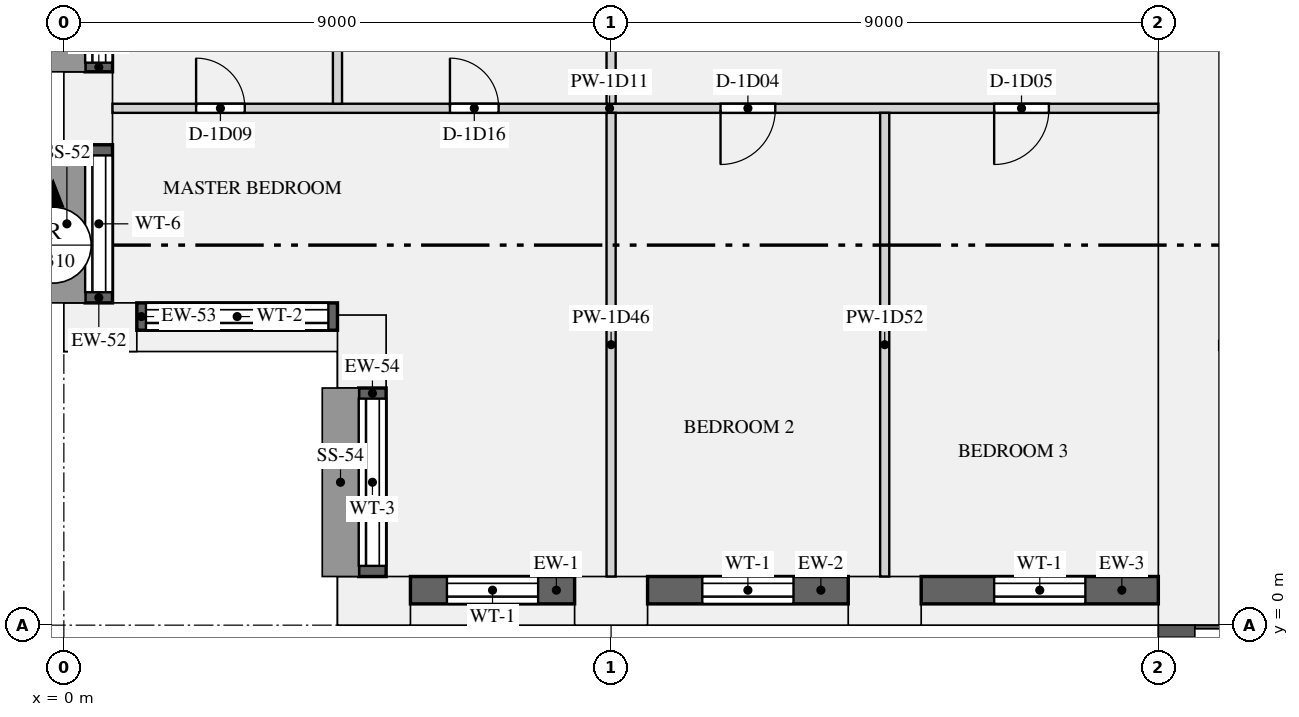
"""IFC4 building model, lengths in metres.
Left out: names, types, materials, properties, quantities, classifications, styles, units other than length and angle.
Written with IfcOpenShell. Run it as: python <this file> out.ifc"""

import sys

from ifc_helpers import new_model, si_unit, direction, frame, frame_2d, origin, origin_2d, place, context, subcontext, project, spatial, rectangle, extrude, element, fill, save


model = new_model("IFC4")
c1 = context("Model", 3, precision=1e-05, world=origin(), true_north=direction((0.0, 1.0)))
c2 = subcontext(c1, "Body", "Model", "MODEL_VIEW")
j1 = project(units=[si_unit("LENGTHUNIT", "METRE"), si_unit("PLANEANGLEUNIT", "RADIAN")], contexts=[c1])
p1 = place(None, origin())
s1 = spatial("IfcSite", under=j1, at=p1, CompositionType="ELEMENT")
p2 = place(p1, origin())
s2 = spatial("IfcBuilding", under=s1, at=p2, CompositionType="ELEMENT")
p3 = place(p2, frame((0.0, 0.0, 47.85)))
s3 = spatial("IfcBuildingStorey", under=s2, at=p3, CompositionType="ELEMENT", Elevation=47.85)
for number, where, z_axis, x_axis in (
    (1, (5.1, 0.4, 0.0), (0.0, 0.0, 1.0), (1.0, 0.0, 0.0)),
    (2, (9.0, 0.4, 0.0), (0.0, 0.0, 1.0), (1.0, 0.0, 0.0)),
    (3, (13.5, 0.4, 0.0), (0.0, 0.0, 1.0), (1.0, 0.0, 0.0)),
    (4, (0.4, 8.5, 0.0), (0.0, 0.0, 1.0), (0.0, -1.0, 0.0)),
    (5, (0.6, 4.9, 0.0), (0.0, 0.0, 1.0), (1.0, 0.0, 0.0)),
    (6, (4.9, 4.5, 0.0), (0.0, 0.0, 1.0), (0.0, -1.0, 0.0)),
):
    element("IfcColumn", number, at=place(p3, frame(where, z_axis=z_axis, x_axis=x_axis)), inside=s3, PredefinedType="USERDEFINED", context=c2, shape_type="SweptSolid", body=[
        extrude(rectangle(XDim=1.2, YDim=0.8, at=origin_2d()), origin(), (0.0, 0.0, 1.0), 3.15),
    ])
p4 = place(p3, frame((18.5, 0.0, 0.0), z_axis=(0.0, 0.0, 1.0), x_axis=(0.0, 1.0, 0.0)))
e7 = element("IfcWall", 7, at=p4, inside=s3, PredefinedType="SHEAR", context=c2, shape_type="SweptSolid", body=[
    extrude(rectangle(XDim=12.5, YDim=1.0, at=frame_2d((6.25, 0.0))), origin(), (0.0, 0.0, 1.0), 3.15),
])
p5 = place(p3, frame((5.7, 0.575, 0.9), z_axis=(0.0, 0.0, 1.0), x_axis=(1.0, 0.0, 0.0)))
e8 = element("IfcWall", 8, at=p5, inside=s3, PredefinedType="SOLIDWALL", context=c2, shape_type="SweptSolid", body=[
    extrude(rectangle(XDim=2.7, YDim=0.45, at=frame_2d((1.35, 0.0))), origin(), (0.0, 0.0, 1.0), 1.93),
])
p6 = place(p5, frame((0.6, 0.0, 0.15)))
e9 = element("IfcOpeningElement", 9, at=p6, cuts=e8, PredefinedType="OPENING", context=c2, shape_type="SweptSolid", body=[
    extrude(rectangle(XDim=1.5, YDim=1.5, at=frame_2d((0.75, 0.75))), frame((0.0, 0.235, 0.0), z_axis=(0.0, -1.0, 0.0), x_axis=(1.0, 0.0, 0.0)), (0.0, 0.0, 1.0), 0.47),
])
p7 = place(p3, frame((9.6, 0.575, 0.9), z_axis=(0.0, 0.0, 1.0), x_axis=(1.0, 0.0, 0.0)))
e10 = element("IfcWall", 10, at=p7, inside=s3, PredefinedType="SOLIDWALL", context=c2, shape_type="SweptSolid", body=[
    extrude(rectangle(XDim=3.3, YDim=0.45, at=frame_2d((1.65, 0.0))), origin(), (0.0, 0.0, 1.0), 1.93),
])
p8 = place(p7, frame((0.9, 0.0, 0.15)))
e11 = element("IfcOpeningElement", 11, at=p8, cuts=e10, PredefinedType="OPENING", context=c2, shape_type="SweptSolid", body=[
    extrude(rectangle(XDim=1.5, YDim=1.5, at=frame_2d((0.75, 0.75))), frame((0.0, 0.235, 0.0), z_axis=(0.0, -1.0, 0.0), x_axis=(1.0, 0.0, 0.0)), (0.0, 0.0, 1.0), 0.47),
])
p9 = place(p3, frame((14.1, 0.575, 0.9), z_axis=(0.0, 0.0, 1.0), x_axis=(1.0, 0.0, 0.0)))
e12 = element("IfcWall", 12, at=p9, inside=s3, PredefinedType="SOLIDWALL", context=c2, shape_type="SweptSolid", body=[
    extrude(rectangle(XDim=3.9, YDim=0.45, at=frame_2d((1.95, 0.0))), origin(), (0.0, 0.0, 1.0), 1.93),
])
p10 = place(p9, frame((1.2, 0.0, 0.15)))
e13 = element("IfcOpeningElement", 13, at=p10, cuts=e12, PredefinedType="OPENING", context=c2, shape_type="SweptSolid", body=[
    extrude(rectangle(XDim=1.5, YDim=1.5, at=frame_2d((0.75, 0.75))), frame((0.0, 0.235, 0.0), z_axis=(0.0, -1.0, 0.0), x_axis=(1.0, 0.0, 0.0)), (0.0, 0.0, 1.0), 0.47),
])
p11 = place(p3, frame((0.575, 11.9, 0.9), z_axis=(0.0, 0.0, 1.0), x_axis=(0.0, -1.0, 0.0)))
e14 = element("IfcWall", 14, at=p11, inside=s3, PredefinedType="SOLIDWALL", context=c2, shape_type="SweptSolid", body=[
    extrude(rectangle(XDim=2.8, YDim=0.45, at=frame_2d((1.4, 0.0))), origin(), (0.0, 0.0, 1.0), 1.93),
])
p12 = place(p11, frame((0.15, 0.0, 0.15)))
e15 = element("IfcOpeningElement", 15, at=p12, cuts=e14, PredefinedType="OPENING", context=c2, shape_type="SweptSolid", body=[
    extrude(rectangle(XDim=2.5, YDim=1.5, at=frame_2d((1.25, 0.75))), frame((0.0, 0.235, 0.0), z_axis=(0.0, -1.0, 0.0), x_axis=(1.0, 0.0, 0.0)), (0.0, 0.0, 1.0), 0.47),
])
p13 = place(p3, frame((0.575, 7.9, 0.9), z_axis=(0.0, 0.0, 1.0), x_axis=(0.0, -1.0, 0.0)))
e16 = element("IfcWall", 16, at=p13, inside=s3, PredefinedType="SOLIDWALL", context=c2, shape_type="SweptSolid", body=[
    extrude(rectangle(XDim=2.6, YDim=0.45, at=frame_2d((1.3, 0.0))), origin(), (0.0, 0.0, 1.0), 1.93),
])
p14 = place(p13, frame((0.175, 0.0, 0.15)))
e17 = element("IfcOpeningElement", 17, at=p14, cuts=e16, PredefinedType="OPENING", context=c2, shape_type="SweptSolid", body=[
    extrude(rectangle(XDim=2.25, YDim=1.5, at=frame_2d((1.125, 0.75))), frame((0.0, 0.235, 0.0), z_axis=(0.0, -1.0, 0.0), x_axis=(1.0, 0.0, 0.0)), (0.0, 0.0, 1.0), 0.47),
])
p15 = place(p3, frame((1.2, 5.075, 0.9), z_axis=(0.0, 0.0, 1.0), x_axis=(1.0, 0.0, 0.0)))
e18 = element("IfcWall", 18, at=p15, inside=s3, PredefinedType="SOLIDWALL", context=c2, shape_type="SweptSolid", body=[
    extrude(rectangle(XDim=3.3, YDim=0.45, at=frame_2d((1.65, 0.0))), origin(), (0.0, 0.0, 1.0), 1.93),
])
p16 = place(p15, frame((0.15, 0.0, 0.15)))
e19 = element("IfcOpeningElement", 19, at=p16, cuts=e18, PredefinedType="OPENING", context=c2, shape_type="SweptSolid", body=[
    extrude(rectangle(XDim=3.0, YDim=1.5, at=frame_2d((1.5, 0.75))), frame((0.0, 0.235, 0.0), z_axis=(0.0, -1.0, 0.0), x_axis=(1.0, 0.0, 0.0)), (0.0, 0.0, 1.0), 0.47),
])
p17 = place(p3, frame((5.075, 3.9, 0.9), z_axis=(0.0, 0.0, 1.0), x_axis=(0.0, -1.0, 0.0)))
e20 = element("IfcWall", 20, at=p17, inside=s3, PredefinedType="SOLIDWALL", context=c2, shape_type="SweptSolid", body=[
    extrude(rectangle(XDim=3.1, YDim=0.45, at=frame_2d((1.55, 0.0))), origin(), (0.0, 0.0, 1.0), 1.93),
])
p18 = place(p17, frame((0.175, 0.0, 0.15)))
e21 = element("IfcOpeningElement", 21, at=p18, cuts=e20, PredefinedType="OPENING", context=c2, shape_type="SweptSolid", body=[
    extrude(rectangle(XDim=2.75, YDim=1.5, at=frame_2d((1.375, 0.75))), frame((0.0, 0.235, 0.0), z_axis=(0.0, -1.0, 0.0), x_axis=(1.0, 0.0, 0.0)), (0.0, 0.0, 1.0), 0.47),
])
p19 = place(p3, frame((19.0, 4.6, 0.0), z_axis=(0.0, 0.0, 1.0), x_axis=(1.0, 0.0, 0.0)))
e22 = element("IfcWall", 22, at=p19, inside=s3, PredefinedType="PARTITIONING", context=c2, shape_type="SweptSolid", body=[
    extrude(rectangle(XDim=8.3, YDim=0.15, at=frame_2d((4.15, 0.0))), origin(), (0.0, 0.0, 1.0), 2.83),
])
p20 = place(p19, frame((0.45, 0.0, 0.0)))
e23 = element("IfcOpeningElement", 23, at=p20, cuts=e22, PredefinedType="OPENING", context=c2, shape_type="SweptSolid", body=[
    extrude(rectangle(XDim=0.9, YDim=2.1, at=frame_2d((0.45, 1.05))), frame((0.0, 0.085, 0.0), z_axis=(0.0, -1.0, 0.0), x_axis=(1.0, 0.0, 0.0)), (0.0, 0.0, 1.0), 0.17),
])
p21 = place(p19, frame((5.85, 0.0, 0.0)))
e24 = element("IfcOpeningElement", 24, at=p21, cuts=e22, PredefinedType="OPENING", context=c2, shape_type="SweptSolid", body=[
    extrude(rectangle(XDim=0.9, YDim=2.1, at=frame_2d((0.45, 1.05))), frame((0.0, 0.085, 0.0), z_axis=(0.0, -1.0, 0.0), x_axis=(1.0, 0.0, 0.0)), (0.0, 0.0, 1.0), 0.17),
])
p22 = place(p3, frame((0.8, 8.5, 0.0), z_axis=(0.0, 0.0, 1.0), x_axis=(1.0, 0.0, 0.0)))
e25 = element("IfcWall", 25, at=p22, inside=s3, PredefinedType="PARTITIONING", context=c2, shape_type="SweptSolid", body=[
    extrude(rectangle(XDim=17.2, YDim=0.15, at=frame_2d((8.6, 0.0))), origin(), (0.0, 0.0, 1.0), 2.83),
])
p23 = place(p22, frame((10.0, 0.0, 0.0)))
e26 = element("IfcOpeningElement", 26, at=p23, cuts=e25, PredefinedType="OPENING", context=c2, shape_type="SweptSolid", body=[
    extrude(rectangle(XDim=0.9, YDim=2.1, at=frame_2d((0.45, 1.05))), frame((0.0, 0.085, 0.0), z_axis=(0.0, -1.0, 0.0), x_axis=(1.0, 0.0, 0.0)), (0.0, 0.0, 1.0), 0.17),
])
p24 = place(p22, frame((14.5, 0.0, 0.0)))
e27 = element("IfcOpeningElement", 27, at=p24, cuts=e25, PredefinedType="OPENING", context=c2, shape_type="SweptSolid", body=[
    extrude(rectangle(XDim=0.9, YDim=2.1, at=frame_2d((0.45, 1.05))), frame((0.0, 0.085, 0.0), z_axis=(0.0, -1.0, 0.0), x_axis=(1.0, 0.0, 0.0)), (0.0, 0.0, 1.0), 0.17),
])
p25 = place(p22, frame((1.375, 0.0, 0.0)))
e28 = element("IfcOpeningElement", 28, at=p25, cuts=e25, PredefinedType="OPENING", context=c2, shape_type="SweptSolid", body=[
    extrude(rectangle(XDim=0.8, YDim=2.1, at=frame_2d((0.4, 1.05))), frame((0.0, 0.085, 0.0), z_axis=(0.0, -1.0, 0.0), x_axis=(1.0, 0.0, 0.0)), (0.0, 0.0, 1.0), 0.17),
])
p26 = place(p22, frame((5.55, 0.0, 0.0)))
e29 = element("IfcOpeningElement", 29, at=p26, cuts=e25, PredefinedType="OPENING", context=c2, shape_type="SweptSolid", body=[
    extrude(rectangle(XDim=0.8, YDim=2.1, at=frame_2d((0.4, 1.05))), frame((0.0, 0.085, 0.0), z_axis=(0.0, -1.0, 0.0), x_axis=(1.0, 0.0, 0.0)), (0.0, 0.0, 1.0), 0.17),
])
p27 = place(p3, frame((9.0, 0.8, 0.0), z_axis=(0.0, 0.0, 1.0), x_axis=(0.0, 1.0, 0.0)))
e30 = element("IfcWall", 30, at=p27, inside=s3, PredefinedType="PARTITIONING", context=c2, shape_type="SweptSolid", body=[
    extrude(rectangle(XDim=7.625, YDim=0.15, at=frame_2d((3.812, 0.0))), origin(), (0.0, 0.0, 1.0), 2.83),
])
p28 = place(p3, frame((9.0, 8.575, 0.0), z_axis=(0.0, 0.0, 1.0), x_axis=(0.0, 1.0, 0.0)))
e31 = element("IfcWall", 31, at=p28, inside=s3, PredefinedType="PARTITIONING", context=c2, shape_type="SweptSolid", body=[
    extrude(rectangle(XDim=3.85, YDim=0.15, at=frame_2d((1.925, 0.0))), origin(), (0.0, 0.0, 1.0), 2.83),
])
p29 = place(p28, frame((1.15, 0.0, 0.0)))
e32 = element("IfcOpeningElement", 32, at=p29, cuts=e31, PredefinedType="OPENING", context=c2, shape_type="SweptSolid", body=[
    extrude(rectangle(XDim=0.8, YDim=2.1, at=frame_2d((0.4, 1.05))), frame((0.0, 0.085, 0.0), z_axis=(0.0, -1.0, 0.0), x_axis=(1.0, 0.0, 0.0)), (0.0, 0.0, 1.0), 0.17),
])
p30 = place(p3, frame((13.5, 0.8, 0.0), z_axis=(0.0, 0.0, 1.0), x_axis=(0.0, 1.0, 0.0)))
e33 = element("IfcWall", 33, at=p30, inside=s3, PredefinedType="PARTITIONING", context=c2, shape_type="SweptSolid", body=[
    extrude(rectangle(XDim=7.625, YDim=0.15, at=frame_2d((3.812, 0.0))), origin(), (0.0, 0.0, 1.0), 2.83),
])
p31 = place(p3, frame((4.5, 8.575, 0.0), z_axis=(0.0, 0.0, 1.0), x_axis=(0.0, 1.0, 0.0)))
e34 = element("IfcWall", 34, at=p31, inside=s3, PredefinedType="PARTITIONING", context=c2, shape_type="SweptSolid", body=[
    extrude(rectangle(XDim=3.85, YDim=0.15, at=frame_2d((1.925, 0.0))), origin(), (0.0, 0.0, 1.0), 2.83),
])
p32 = place(p31, frame((1.525, 0.0, 0.0)))
e35 = element("IfcOpeningElement", 35, at=p32, cuts=e34, PredefinedType="OPENING", context=c2, shape_type="SweptSolid", body=[
    extrude(rectangle(XDim=0.8, YDim=2.1, at=frame_2d((0.4, 1.05))), frame((0.0, 0.085, 0.0), z_axis=(0.0, -1.0, 0.0), x_axis=(1.0, 0.0, 0.0)), (0.0, 0.0, 1.0), 0.17),
])
p33 = place(p6, origin())
e36 = element("IfcWindow", 36, at=p33, inside=s3, PartitioningType="SINGLE_PANEL", PredefinedType="WINDOW", context=c2, shape_type="SweptSolid", body=[
    extrude(rectangle(XDim=1.5, YDim=1.5, at=frame_2d((0.75, 0.75))), frame((0.0, -0.065, 0.0), z_axis=(0.0, -1.0, 0.0), x_axis=(1.0, 0.0, 0.0)), (0.0, 0.0, 1.0), 0.06),
])
fill(e9, e36)
p34 = place(p8, origin())
e37 = element("IfcWindow", 37, at=p34, inside=s3, PartitioningType="SINGLE_PANEL", PredefinedType="WINDOW", context=c2, shape_type="SweptSolid", body=[
    extrude(rectangle(XDim=1.5, YDim=1.5, at=frame_2d((0.75, 0.75))), frame((0.0, -0.065, 0.0), z_axis=(0.0, -1.0, 0.0), x_axis=(1.0, 0.0, 0.0)), (0.0, 0.0, 1.0), 0.06),
])
fill(e11, e37)
p35 = place(p10, origin())
e38 = element("IfcWindow", 38, at=p35, inside=s3, PartitioningType="SINGLE_PANEL", PredefinedType="WINDOW", context=c2, shape_type="SweptSolid", body=[
    extrude(rectangle(XDim=1.5, YDim=1.5, at=frame_2d((0.75, 0.75))), frame((0.0, -0.065, 0.0), z_axis=(0.0, -1.0, 0.0), x_axis=(1.0, 0.0, 0.0)), (0.0, 0.0, 1.0), 0.06),
])
fill(e13, e38)
p36 = place(p12, origin())
e39 = element("IfcWindow", 39, at=p36, inside=s3, PartitioningType="SINGLE_PANEL", PredefinedType="WINDOW", context=c2, shape_type="SweptSolid", body=[
    extrude(rectangle(XDim=2.5, YDim=1.5, at=frame_2d((1.25, 0.75))), frame((0.0, -0.065, 0.0), z_axis=(0.0, -1.0, 0.0), x_axis=(1.0, 0.0, 0.0)), (0.0, 0.0, 1.0), 0.06),
])
fill(e15, e39)
p37 = place(p14, origin())
e40 = element("IfcWindow", 40, at=p37, inside=s3, PartitioningType="SINGLE_PANEL", PredefinedType="WINDOW", context=c2, shape_type="SweptSolid", body=[
    extrude(rectangle(XDim=2.25, YDim=1.5, at=frame_2d((1.125, 0.75))), frame((0.0, -0.065, 0.0), z_axis=(0.0, -1.0, 0.0), x_axis=(1.0, 0.0, 0.0)), (0.0, 0.0, 1.0), 0.06),
])
fill(e17, e40)
p38 = place(p16, origin())
e41 = element("IfcWindow", 41, at=p38, inside=s3, PartitioningType="SINGLE_PANEL", PredefinedType="WINDOW", context=c2, shape_type="SweptSolid", body=[
    extrude(rectangle(XDim=3.0, YDim=1.5, at=frame_2d((1.5, 0.75))), frame((0.0, -0.065, 0.0), z_axis=(0.0, -1.0, 0.0), x_axis=(1.0, 0.0, 0.0)), (0.0, 0.0, 1.0), 0.06),
])
fill(e19, e41)
p39 = place(p18, origin())
e42 = element("IfcWindow", 42, at=p39, inside=s3, PartitioningType="SINGLE_PANEL", PredefinedType="WINDOW", context=c2, shape_type="SweptSolid", body=[
    extrude(rectangle(XDim=2.75, YDim=1.5, at=frame_2d((1.375, 0.75))), frame((0.0, -0.065, 0.0), z_axis=(0.0, -1.0, 0.0), x_axis=(1.0, 0.0, 0.0)), (0.0, 0.0, 1.0), 0.06),
])
fill(e21, e42)
p40 = place(p23, frame((0.9, 0.0, 0.0), z_axis=(0.0, 0.0, 1.0), x_axis=(-1.0, 0.0, 0.0)))
e43 = element("IfcDoor", 43, at=p40, inside=s3, OperationType="SINGLE_SWING_RIGHT", PredefinedType="DOOR", context=c2, shape_type="SweptSolid", body=[
    extrude(rectangle(XDim=0.9, YDim=2.1, at=frame_2d((0.45, 1.05))), frame((0.0, 0.025, 0.0), z_axis=(0.0, -1.0, 0.0), x_axis=(1.0, 0.0, 0.0)), (0.0, 0.0, 1.0), 0.05),
])
fill(e26, e43)
p41 = place(p24, frame((0.9, 0.0, 0.0), z_axis=(0.0, 0.0, 1.0), x_axis=(-1.0, 0.0, 0.0)))
e44 = element("IfcDoor", 44, at=p41, inside=s3, OperationType="SINGLE_SWING_RIGHT", PredefinedType="DOOR", context=c2, shape_type="SweptSolid", body=[
    extrude(rectangle(XDim=0.9, YDim=2.1, at=frame_2d((0.45, 1.05))), frame((0.0, 0.025, 0.0), z_axis=(0.0, -1.0, 0.0), x_axis=(1.0, 0.0, 0.0)), (0.0, 0.0, 1.0), 0.05),
])
fill(e27, e44)
p42 = place(p25, origin())
e45 = element("IfcDoor", 45, at=p42, inside=s3, OperationType="SINGLE_SWING_LEFT", PredefinedType="DOOR", context=c2, shape_type="SweptSolid", body=[
    extrude(rectangle(XDim=0.8, YDim=2.1, at=frame_2d((0.4, 1.05))), frame((0.0, 0.025, 0.0), z_axis=(0.0, -1.0, 0.0), x_axis=(1.0, 0.0, 0.0)), (0.0, 0.0, 1.0), 0.05),
])
fill(e28, e45)
p43 = place(p26, origin())
e46 = element("IfcDoor", 46, at=p43, inside=s3, OperationType="SINGLE_SWING_LEFT", PredefinedType="DOOR", context=c2, shape_type="SweptSolid", body=[
    extrude(rectangle(XDim=0.8, YDim=2.1, at=frame_2d((0.4, 1.05))), frame((0.0, 0.025, 0.0), z_axis=(0.0, -1.0, 0.0), x_axis=(1.0, 0.0, 0.0)), (0.0, 0.0, 1.0), 0.05),
])
fill(e29, e46)
save(model, sys.argv[1])
